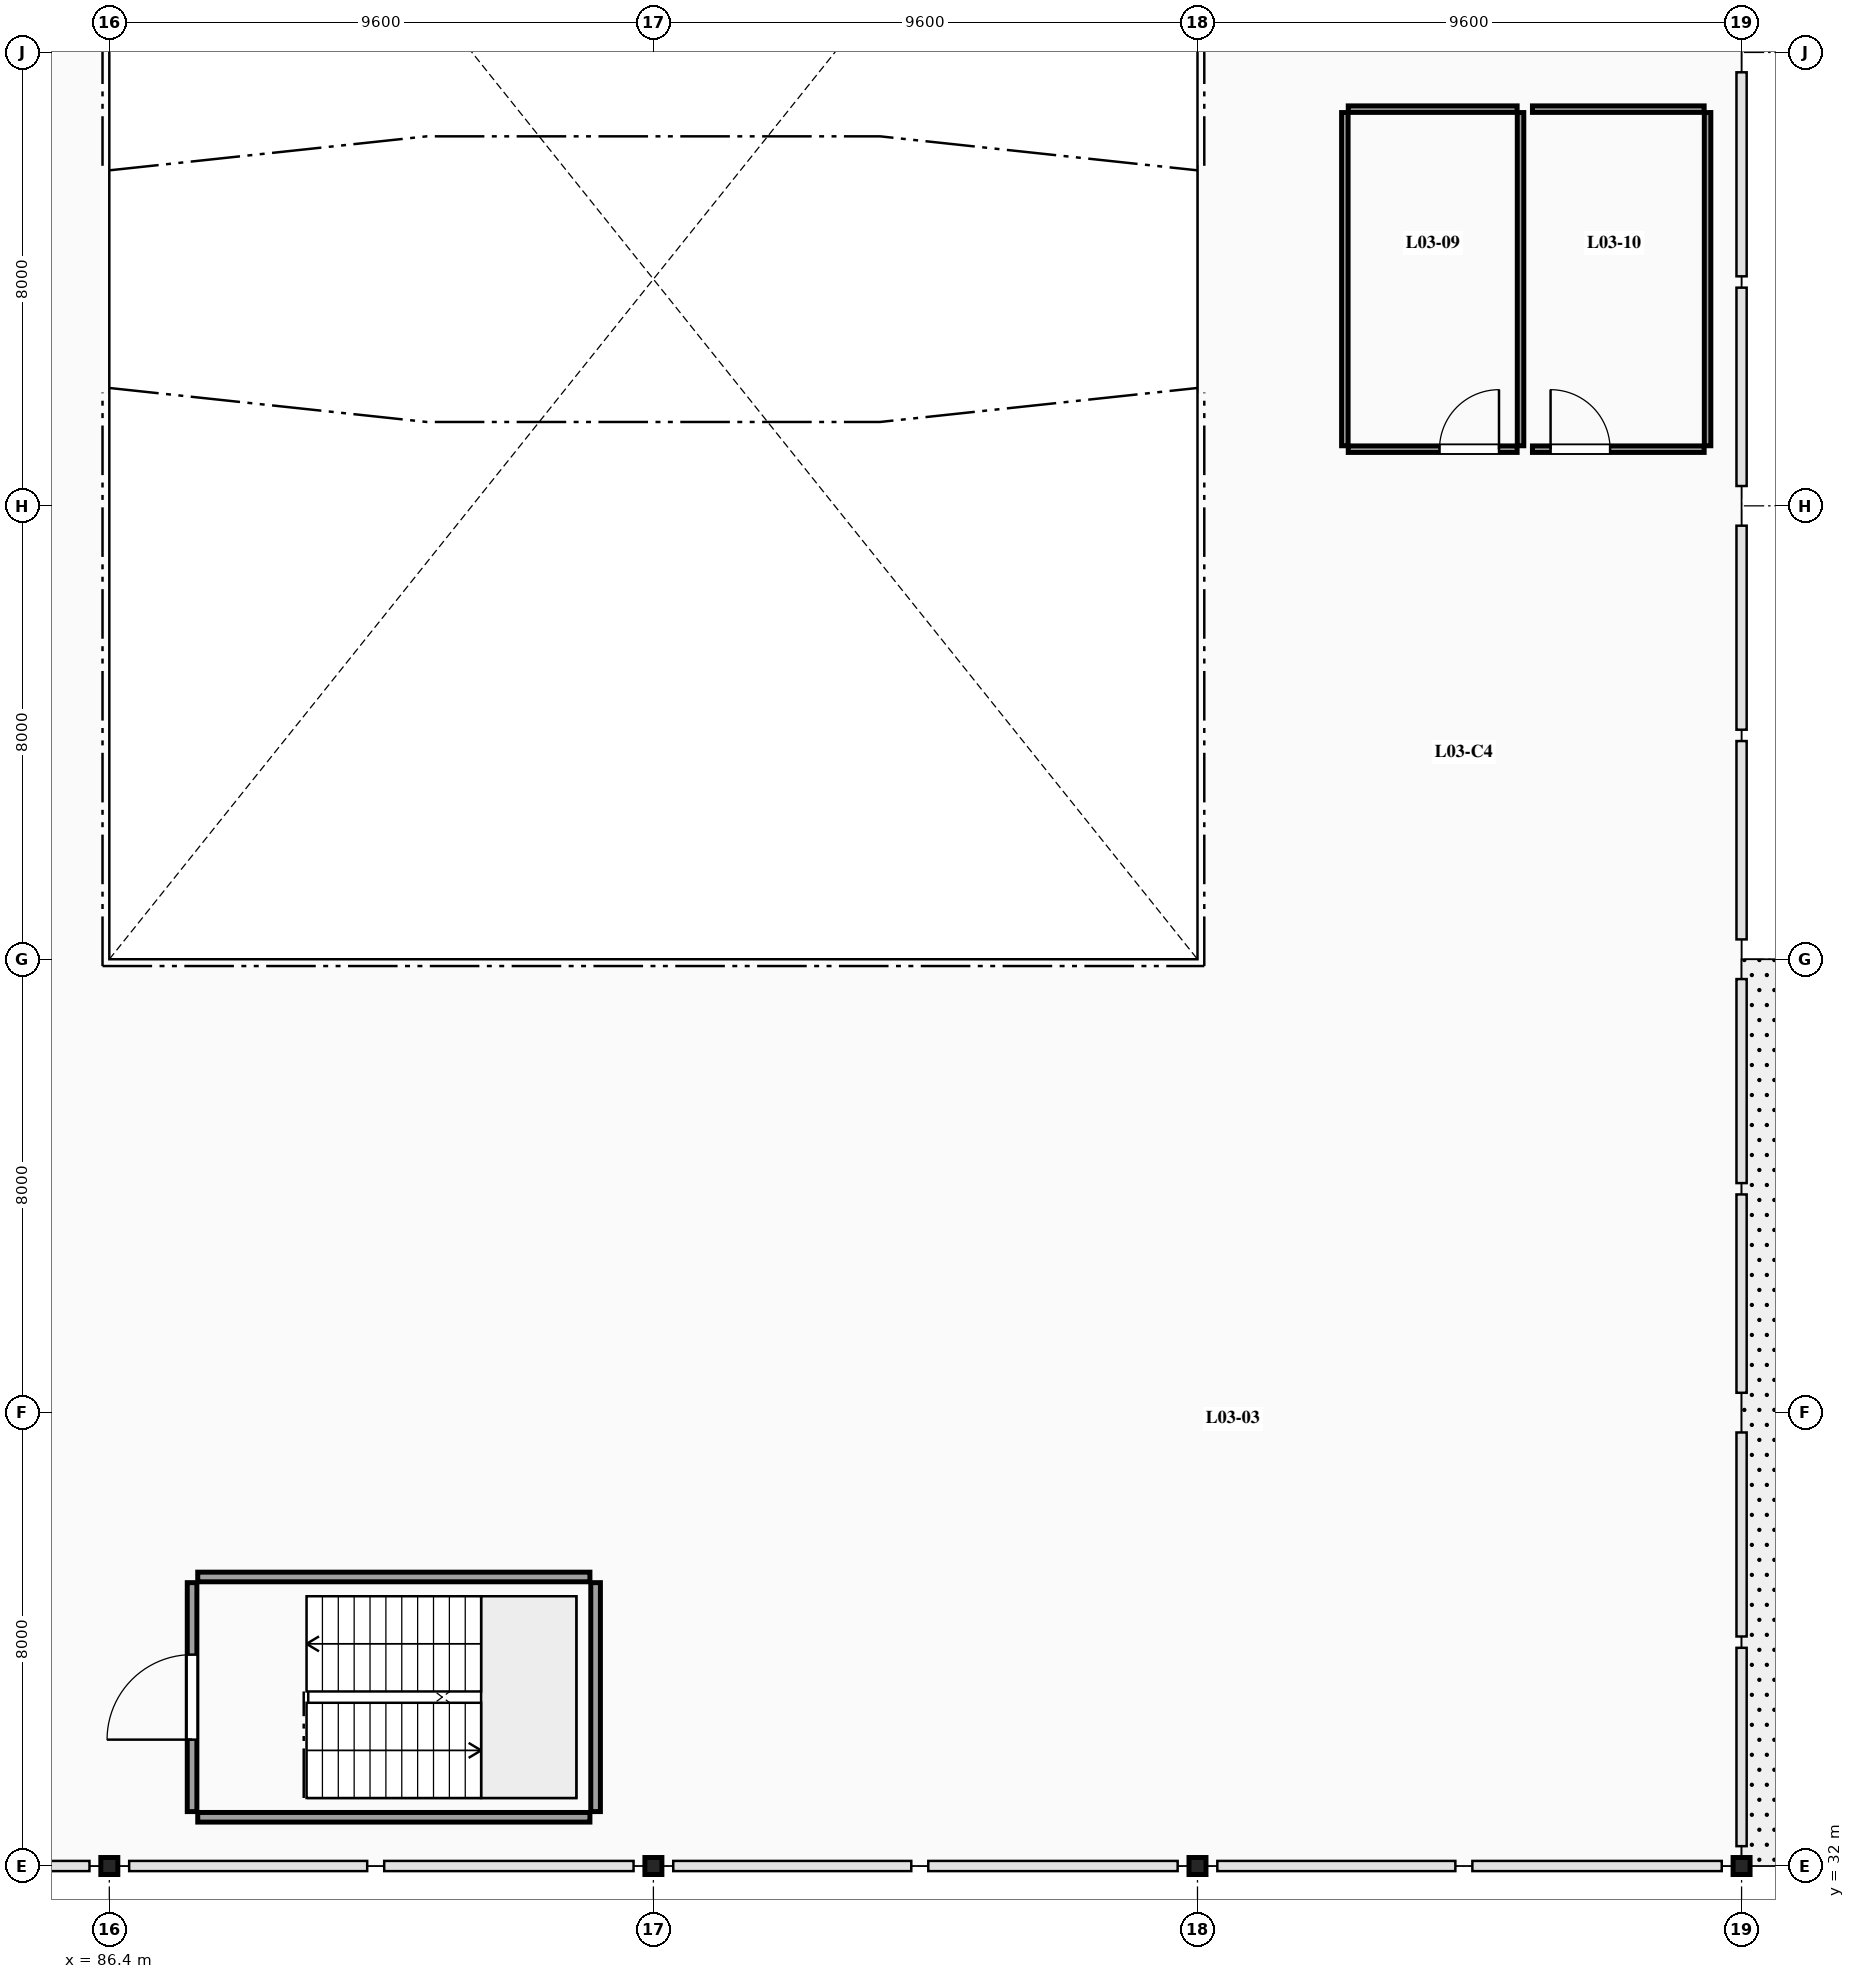
"""IFC4 building model, lengths in metres.
Left out: names, types, materials, properties, quantities, classifications, styles, units other than length and angle.
Written with IfcOpenShell. Run it as: python <this file> out.ifc"""

import sys

from ifc_helpers import new_model, si_unit, direction, frame, frame_2d, origin, origin_2d, place, context, subcontext, project, spatial, rectangle, i_section, extrude, element, fill, save


model = new_model("IFC4")
c1 = context("Model", 3, precision=1e-05, world=origin(), true_north=direction((0.0, 1.0)))
c2 = subcontext(c1, "Body", "Model", "MODEL_VIEW")
j1 = project(units=[si_unit("LENGTHUNIT", "METRE"), si_unit("PLANEANGLEUNIT", "RADIAN")], contexts=[c1])
p1 = place(None, origin())
s1 = spatial("IfcSite", under=j1, at=p1, CompositionType="ELEMENT")
p2 = place(p1, origin())
s2 = spatial("IfcBuilding", under=s1, at=p2, CompositionType="ELEMENT")
p3 = place(p2, frame((0.0, 0.0, 12.9)))
s3 = spatial("IfcBuildingStorey", under=s2, at=p3, CompositionType="ELEMENT", Elevation=12.9)
for number, where, z_axis, x_axis in (
    (1, (86.4, 32.0, -0.26), (0.0, 0.0, 1.0), (1.0, 0.0, 0.0)),
    (2, (96.0, 32.0, -0.26), (0.0, 0.0, 1.0), (1.0, 0.0, 0.0)),
    (3, (105.6, 32.0, -0.26), (0.0, 0.0, 1.0), (1.0, 0.0, 0.0)),
    (4, (115.2, 32.0, -0.26), (0.0, 0.0, 1.0), (1.0, 0.0, 0.0)),
):
    element("IfcColumn", number, at=place(p3, frame(where, z_axis=z_axis, x_axis=x_axis)), inside=s3, PredefinedType="COLUMN", context=c2, shape_type="SweptSolid", body=[
        extrude(i_section(OverallWidth=0.3, OverallDepth=0.3, WebThickness=0.011, FlangeThickness=0.019, FilletRadius=0.027, at=origin_2d()), origin(), (0.0, 0.0, 1.0), 4.76),
    ])
p4 = place(p3, frame((87.86, 32.96, 0.0), z_axis=(0.0, 0.0, 1.0), x_axis=(0.0, 1.0, 0.0)))
e5 = element("IfcWall", 5, at=p4, inside=s3, PredefinedType="SOLIDWALL", context=c2, shape_type="SweptSolid", body=[
    extrude(rectangle(XDim=4.04, YDim=0.17, at=frame_2d((2.02, 0.0))), origin(), (0.0, 0.0, 1.0), 3.38),
])
p5 = place(p4, frame((1.27, 0.0, 0.0)))
e6 = element("IfcOpeningElement", 6, at=p5, cuts=e5, PredefinedType="OPENING", context=c2, shape_type="SweptSolid", body=[
    extrude(rectangle(XDim=1.5, YDim=2.2, at=frame_2d((0.75, 1.1))), frame((0.0, 0.095, 0.0), z_axis=(0.0, -1.0, 0.0), x_axis=(1.0, 0.0, 0.0)), (0.0, 0.0, 1.0), 0.19),
])
p6 = place(p3, frame((94.98, 32.96, 0.0), z_axis=(0.0, 0.0, 1.0), x_axis=(0.0, 1.0, 0.0)))
e7 = element("IfcWall", 7, at=p6, inside=s3, PredefinedType="SOLIDWALL", context=c2, shape_type="SweptSolid", body=[
    extrude(rectangle(XDim=4.04, YDim=0.17, at=frame_2d((2.02, 0.0))), origin(), (0.0, 0.0, 1.0), 3.38),
])
for number, where, z_axis, x_axis in (
    (8, (87.96, 32.86, 0.0), (0.0, 0.0, 1.0), (1.0, 0.0, 0.0)),
    (9, (87.96, 37.1, 0.0), (0.0, 0.0, 1.0), (1.0, 0.0, 0.0)),
):
    element("IfcWall", number, at=place(p3, frame(where, z_axis=z_axis, x_axis=x_axis)), inside=s3, PredefinedType="SOLIDWALL", context=c2, shape_type="SweptSolid", body=[
        extrude(rectangle(XDim=6.92, YDim=0.17, at=frame_2d((3.46, 0.0))), origin(), (0.0, 0.0, 1.0), 3.38),
    ])
p7 = place(p3, frame((108.26, 63.0, 0.0), z_axis=(0.0, 0.0, 1.0), x_axis=(1.0, 0.0, 0.0)))
e10 = element("IfcWall", 10, at=p7, inside=s3, PredefinedType="PARTITIONING", context=c2, shape_type="SweptSolid", body=[
    extrude(rectangle(XDim=2.98, YDim=0.115, at=frame_2d((1.49, 0.0))), origin(), (0.0, 0.0, 1.0), 3.38),
])
p8 = place(p3, frame((108.26, 57.0, 0.0), z_axis=(0.0, 0.0, 1.0), x_axis=(1.0, 0.0, 0.0)))
e11 = element("IfcWall", 11, at=p8, inside=s3, PredefinedType="PARTITIONING", context=c2, shape_type="SweptSolid", body=[
    extrude(rectangle(XDim=2.98, YDim=0.115, at=frame_2d((1.49, 0.0))), origin(), (0.0, 0.0, 1.0), 3.38),
])
p9 = place(p8, frame((1.61, 0.0, 0.0)))
e12 = element("IfcOpeningElement", 12, at=p9, cuts=e11, PredefinedType="OPENING", context=c2, shape_type="SweptSolid", body=[
    extrude(rectangle(XDim=1.05, YDim=2.15, at=frame_2d((0.525, 1.075))), frame((0.0, 0.067, 0.0), z_axis=(0.0, -1.0, 0.0), x_axis=(1.0, 0.0, 0.0)), (0.0, 0.0, 1.0), 0.135),
])
for number, where, z_axis, x_axis in (
    (13, (108.2, 57.06, 0.0), (0.0, 0.0, 1.0), (0.0, 1.0, 0.0)),
    (14, (111.3, 57.06, 0.0), (0.0, 0.0, 1.0), (0.0, 1.0, 0.0)),
):
    element("IfcWall", number, at=place(p3, frame(where, z_axis=z_axis, x_axis=x_axis)), inside=s3, PredefinedType="PARTITIONING", context=c2, shape_type="SweptSolid", body=[
        extrude(rectangle(XDim=5.88, YDim=0.115, at=frame_2d((2.94, 0.0))), origin(), (0.0, 0.0, 1.0), 3.38),
    ])
p10 = place(p3, frame((111.51, 63.0, 0.0), z_axis=(0.0, 0.0, 1.0), x_axis=(1.0, 0.0, 0.0)))
e15 = element("IfcWall", 15, at=p10, inside=s3, PredefinedType="PARTITIONING", context=c2, shape_type="SweptSolid", body=[
    extrude(rectangle(XDim=3.03, YDim=0.115, at=frame_2d((1.515, 0.0))), origin(), (0.0, 0.0, 1.0), 3.38),
])
p11 = place(p3, frame((111.51, 57.0, 0.0), z_axis=(0.0, 0.0, 1.0), x_axis=(1.0, 0.0, 0.0)))
e16 = element("IfcWall", 16, at=p11, inside=s3, PredefinedType="PARTITIONING", context=c2, shape_type="SweptSolid", body=[
    extrude(rectangle(XDim=3.03, YDim=0.115, at=frame_2d((1.515, 0.0))), origin(), (0.0, 0.0, 1.0), 3.38),
])
p12 = place(p11, frame((0.32, 0.0, 0.0)))
e17 = element("IfcOpeningElement", 17, at=p12, cuts=e16, PredefinedType="OPENING", context=c2, shape_type="SweptSolid", body=[
    extrude(rectangle(XDim=1.05, YDim=2.15, at=frame_2d((0.525, 1.075))), frame((0.0, 0.067, 0.0), z_axis=(0.0, -1.0, 0.0), x_axis=(1.0, 0.0, 0.0)), (0.0, 0.0, 1.0), 0.135),
])
p13 = place(p3, frame((114.6, 57.06, 0.0), z_axis=(0.0, 0.0, 1.0), x_axis=(0.0, 1.0, 0.0)))
e18 = element("IfcWall", 18, at=p13, inside=s3, PredefinedType="PARTITIONING", context=c2, shape_type="SweptSolid", body=[
    extrude(rectangle(XDim=5.88, YDim=0.115, at=frame_2d((2.94, 0.0))), origin(), (0.0, 0.0, 1.0), 3.38),
])
p14 = place(p5, origin())
e19 = element("IfcDoor", 19, at=p14, inside=s3, OperationType="SINGLE_SWING_LEFT", PredefinedType="DOOR", context=c2, shape_type="SweptSolid", body=[
    extrude(rectangle(XDim=1.5, YDim=2.2, at=frame_2d((0.75, 1.1))), frame((0.0, 0.025, 0.0), z_axis=(0.0, -1.0, 0.0), x_axis=(1.0, 0.0, 0.0)), (0.0, 0.0, 1.0), 0.05),
])
fill(e6, e19)
p15 = place(p9, origin())
e20 = element("IfcDoor", 20, at=p15, inside=s3, OperationType="SINGLE_SWING_RIGHT", PredefinedType="DOOR", context=c2, shape_type="SweptSolid", body=[
    extrude(rectangle(XDim=1.05, YDim=2.15, at=frame_2d((0.525, 1.075))), frame((0.0, 0.025, 0.0), z_axis=(0.0, -1.0, 0.0), x_axis=(1.0, 0.0, 0.0)), (0.0, 0.0, 1.0), 0.05),
])
fill(e12, e20)
p16 = place(p12, origin())
e21 = element("IfcDoor", 21, at=p16, inside=s3, OperationType="SINGLE_SWING_LEFT", PredefinedType="DOOR", context=c2, shape_type="SweptSolid", body=[
    extrude(rectangle(XDim=1.05, YDim=2.15, at=frame_2d((0.525, 1.075))), frame((0.0, 0.025, 0.0), z_axis=(0.0, -1.0, 0.0), x_axis=(1.0, 0.0, 0.0)), (0.0, 0.0, 1.0), 0.05),
])
fill(e17, e21)
save(model, sys.argv[1])
